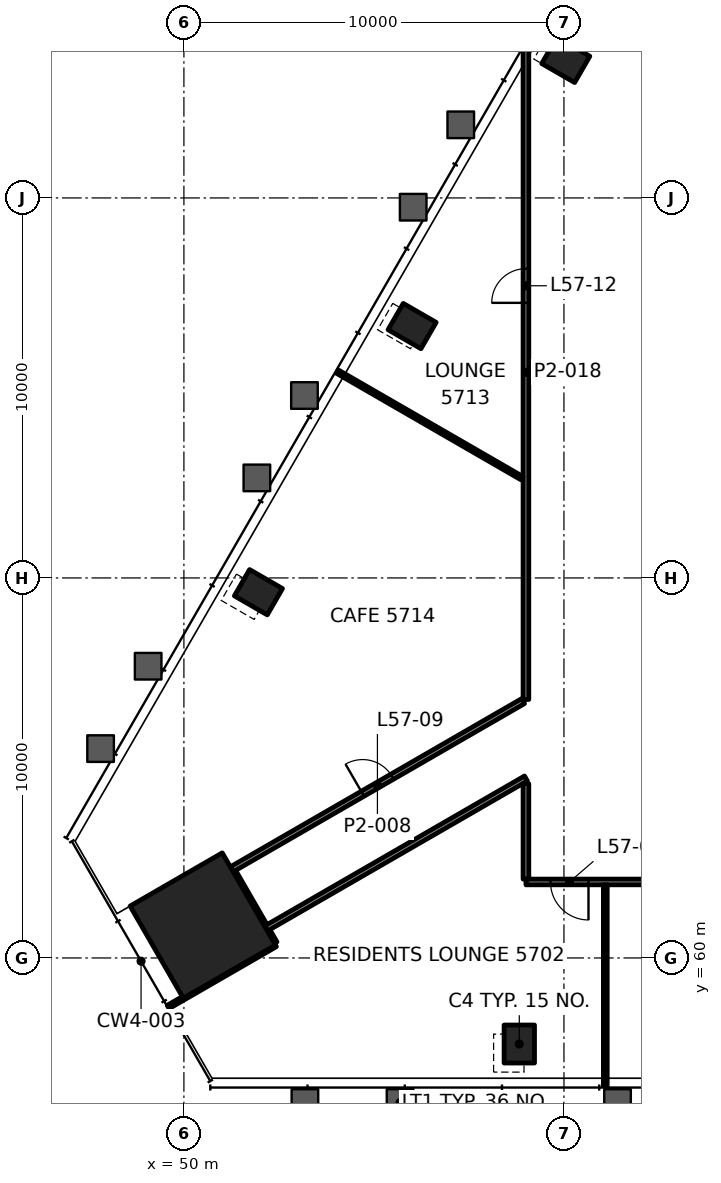
"""IFC4 building model, lengths in metres.
Left out: names, types, materials, properties, quantities, classifications, styles, units other than length and angle.
Written with IfcOpenShell. Run it as: python <this file> out.ifc"""

import sys

from ifc_helpers import new_model, si_unit, direction, frame, frame_2d, origin, origin_2d, place, context, subcontext, project, spatial, rectangle, hollow_rectangle, extrude, element, fill, save


model = new_model("IFC4")
c1 = context("Model", 3, precision=1e-05, world=origin(), true_north=direction((0.0, 1.0)))
c2 = subcontext(c1, "Body", "Model", "MODEL_VIEW")
j1 = project(units=[si_unit("LENGTHUNIT", "METRE"), si_unit("PLANEANGLEUNIT", "RADIAN")], contexts=[c1])
p1 = place(None, origin())
s1 = spatial("IfcSite", under=j1, at=p1, CompositionType="ELEMENT")
p2 = place(p1, origin())
s2 = spatial("IfcBuilding", under=s1, at=p2, CompositionType="ELEMENT")
p3 = place(p2, frame((0.0, 0.0, 241.6)))
s3 = spatial("IfcBuildingStorey", under=s2, at=p3, CompositionType="ELEMENT", Elevation=241.6)
p4 = place(p3, frame((50.496, 60.853, 0.0), z_axis=(0.0, 0.0, 1.0), x_axis=(0.5, -0.866025403784, 0.0)))
e1 = element("IfcColumn", 1, at=p4, inside=s3, PredefinedType="COLUMN", context=c2, shape_type="SweptSolid", body=[
    extrude(rectangle(XDim=2.8, YDim=2.8, at=origin_2d()), origin(), (0.0, 0.0, 1.0), 6.0),
])
for number, where, z_axis, x_axis in (
    (2, (58.825, 57.735, -0.0), (0.0, 0.0, 1.0), (1.0, 0.0, 0.0)),
    (3, (60.048, 83.632, -0.0), (0.0, 0.0, 1.0), (-0.5, -0.866, 0.0)),
    (4, (56.004, 76.628, -0.0), (0.0, 0.0, 1.0), (-0.5, -0.866, 0.0)),
    (5, (51.961, 69.625, -0.0), (0.0, 0.0, 1.0), (-0.5, -0.866, 0.0)),
):
    element("IfcColumn", number, at=place(p3, frame(where, z_axis=z_axis, x_axis=x_axis)), inside=s3, PredefinedType="COLUMN", context=c2, shape_type="SweptSolid", body=[
        extrude(hollow_rectangle(XDim=0.8, YDim=1.0, WallThickness=0.05, at=origin_2d()), origin(), (0.0, 0.0, 1.0), 6.0),
    ])
p5 = place(p3, frame((91.0, 62.0, 0.0), z_axis=(0.0, 0.0, 1.0), x_axis=(-1.0, 0.0, 0.0)))
e6 = element("IfcWall", 6, at=p5, inside=s3, PredefinedType="PARTITIONING", context=c2, shape_type="SweptSolid", body=[
    extrude(rectangle(XDim=31.999, YDim=0.15, at=frame_2d((16.0, 0.0))), origin(), (0.0, 0.0, 1.0), 4.95),
])
p6 = place(p5, frame((1.586, 0.0, 0.0)))
e7 = element("IfcOpeningElement", 7, at=p6, cuts=e6, PredefinedType="OPENING", context=c2, shape_type="SweptSolid", body=[
    extrude(rectangle(XDim=0.9, YDim=2.1, at=frame_2d((0.45, 1.05))), frame((0.0, 0.085, 0.0), z_axis=(0.0, -1.0, 0.0), x_axis=(1.0, 0.0, 0.0)), (0.0, 0.0, 1.0), 0.17),
])
p7 = place(p5, frame((10.495, 0.0, 0.0)))
e8 = element("IfcOpeningElement", 8, at=p7, cuts=e6, PredefinedType="OPENING", context=c2, shape_type="SweptSolid", body=[
    extrude(rectangle(XDim=0.9, YDim=2.1, at=frame_2d((0.45, 1.05))), frame((0.0, 0.085, 0.0), z_axis=(0.0, -1.0, 0.0), x_axis=(1.0, 0.0, 0.0)), (0.0, 0.0, 1.0), 0.17),
])
p8 = place(p5, frame((23.467, 0.0, 0.0)))
e9 = element("IfcOpeningElement", 9, at=p8, cuts=e6, PredefinedType="OPENING", context=c2, shape_type="SweptSolid", body=[
    extrude(rectangle(XDim=1.0, YDim=2.1, at=frame_2d((0.5, 1.05))), frame((0.0, 0.085, 0.0), z_axis=(0.0, -1.0, 0.0), x_axis=(1.0, 0.0, 0.0)), (0.0, 0.0, 1.0), 0.17),
])
p9 = place(p5, frame((30.354, 0.0, 0.0)))
e10 = element("IfcOpeningElement", 10, at=p9, cuts=e6, PredefinedType="OPENING", context=c2, shape_type="SweptSolid", body=[
    extrude(rectangle(XDim=1.0, YDim=2.1, at=frame_2d((0.5, 1.05))), frame((0.0, 0.085, 0.0), z_axis=(0.0, -1.0, 0.0), x_axis=(1.0, 0.0, 0.0)), (0.0, 0.0, 1.0), 0.17),
])
p10 = place(p3, frame((49.586, 58.71, 0.0), z_axis=(0.0, 0.0, 1.0), x_axis=(0.866003472149, 0.500037984783, 0.0)))
e11 = element("IfcWall", 11, at=p10, inside=s3, PredefinedType="PARTITIONING", context=c2, shape_type="SweptSolid", body=[
    extrude(rectangle(XDim=3.26, YDim=0.1, at=frame_2d((1.63, 0.0))), origin(), (0.0, 0.0, 1.0), 4.95),
])
p11 = place(p3, frame((52.159, 60.774, 0.0), z_axis=(0.0, 0.0, 1.0), x_axis=(0.866030148722, 0.499991781437, 0.0)))
e12 = element("IfcWall", 12, at=p11, inside=s3, PredefinedType="PARTITIONING", context=c2, shape_type="SweptSolid", body=[
    extrude(rectangle(XDim=7.899, YDim=0.15, at=frame_2d((3.95, 0.0))), origin(), (0.0, 0.0, 1.0), 4.797),
])
p12 = place(p3, frame((51.259, 62.333, 0.0), z_axis=(0.0, 0.0, 1.0), x_axis=(0.866028044417, 0.499995426262, 0.0)))
e13 = element("IfcWall", 13, at=p12, inside=s3, PredefinedType="PARTITIONING", context=c2, shape_type="SweptSolid", body=[
    extrude(rectangle(XDim=8.852, YDim=0.15, at=frame_2d((4.426, 0.0))), origin(), (0.0, 0.0, 1.0), 4.95),
])
p13 = place(p12, frame((3.976, 0.0, 0.0)))
e14 = element("IfcOpeningElement", 14, at=p13, cuts=e13, PredefinedType="OPENING", context=c2, shape_type="SweptSolid", body=[
    extrude(rectangle(XDim=0.9, YDim=2.1, at=frame_2d((0.45, 1.05))), frame((0.0, 0.085, 0.0), z_axis=(0.0, -1.0, 0.0), x_axis=(1.0, 0.0, 0.0)), (0.0, 0.0, 1.0), 0.17),
])
p14 = place(p3, frame((61.088, 56.635, 0.0), z_axis=(0.0, 0.0, 1.0), x_axis=(0.0, 1.0, 0.0)))
e15 = element("IfcWall", 15, at=p14, inside=s3, PredefinedType="PARTITIONING", context=c2, shape_type="SweptSolid", body=[
    extrude(rectangle(XDim=5.29, YDim=0.1, at=frame_2d((2.645, 0.0))), origin(), (0.0, 0.0, 1.0), 4.872),
])
p15 = place(p3, frame((59.0, 62.075, 0.0), z_axis=(0.0, 0.0, 1.0), x_axis=(0.0, 1.0, 0.0)))
e16 = element("IfcWall", 16, at=p15, inside=s3, PredefinedType="PARTITIONING", context=c2, shape_type="SweptSolid", body=[
    extrude(rectangle(XDim=2.511, YDim=0.15, at=frame_2d((1.255, 0.0))), origin(), (0.0, 0.0, 1.0), 4.797),
])
p16 = place(p3, frame((59.0, 66.802, 0.0), z_axis=(0.0, 0.0, 1.0), x_axis=(0.0, 1.0, 0.0)))
e17 = element("IfcWall", 17, at=p16, inside=s3, PredefinedType="PARTITIONING", context=c2, shape_type="SweptSolid", body=[
    extrude(rectangle(XDim=17.215, YDim=0.15, at=frame_2d((8.607, 0.0))), origin(), (0.0, 0.0, 1.0), 4.872),
])
p17 = place(p16, frame((10.438, 0.0, 0.0)))
e18 = element("IfcOpeningElement", 18, at=p17, cuts=e17, PredefinedType="OPENING", context=c2, shape_type="SweptSolid", body=[
    extrude(rectangle(XDim=0.9, YDim=2.1, at=frame_2d((0.45, 1.05))), frame((0.0, 0.085, 0.0), z_axis=(0.0, -1.0, 0.0), x_axis=(1.0, 0.0, 0.0)), (0.0, 0.0, 1.0), 0.17),
])
p18 = place(p3, frame((52.384, 60.384, 0.0), z_axis=(0.0, 0.0, 1.0), x_axis=(-0.500342721131, 0.865827443207, 0.0)))
e19 = element("IfcWall", 19, at=p18, inside=s3, PredefinedType="PARTITIONING", context=c2, shape_type="SweptSolid", body=[
    extrude(rectangle(XDim=0.375, YDim=0.15, at=frame_2d((0.188, 0.0))), origin(), (0.0, 0.0, 1.0), 4.95),
])
p19 = place(p3, frame((58.899, 72.623, 0.0), z_axis=(0.0, 0.0, 1.0), x_axis=(-0.866038463512, 0.499977379206, 0.0)))
e20 = element("IfcWall", 20, at=p19, inside=s3, PredefinedType="PARTITIONING", context=c2, shape_type="SweptSolid", body=[
    extrude(rectangle(XDim=5.61, YDim=0.1, at=frame_2d((2.805, 0.0))), origin(), (0.0, 0.0, 1.0), 4.872),
])
p20 = place(p3, frame((52.122, 60.839, 0.0), z_axis=(0.0, 0.0, 1.0), x_axis=(-0.499991515992, 0.866030301974, 0.0)))
e21 = element("IfcWall", 21, at=p20, inside=s3, PredefinedType="PARTITIONING", context=c2, shape_type="SweptSolid", body=[
    extrude(rectangle(XDim=1.649, YDim=0.15, at=frame_2d((0.825, 0.0))), origin(), (0.0, 0.0, 1.0), 4.797),
])
p21 = place(p9, origin())
e22 = element("IfcDoor", 22, at=p21, inside=s3, OperationType="SINGLE_SWING_RIGHT", PredefinedType="DOOR", context=c2, shape_type="SweptSolid", body=[
    extrude(rectangle(XDim=1.0, YDim=2.1, at=frame_2d((0.5, 1.05))), frame((0.0, 0.025, 0.0), z_axis=(0.0, -1.0, 0.0), x_axis=(1.0, 0.0, 0.0)), (0.0, 0.0, 1.0), 0.05),
])
fill(e10, e22)
p22 = place(p13, origin())
e23 = element("IfcDoor", 23, at=p22, inside=s3, OperationType="SINGLE_SWING_LEFT", PredefinedType="DOOR", context=c2, shape_type="SweptSolid", body=[
    extrude(rectangle(XDim=0.9, YDim=2.1, at=frame_2d((0.45, 1.05))), frame((0.0, 0.025, 0.0), z_axis=(0.0, -1.0, 0.0), x_axis=(1.0, 0.0, 0.0)), (0.0, 0.0, 1.0), 0.05),
])
fill(e14, e23)
p23 = place(p17, origin())
e24 = element("IfcDoor", 24, at=p23, inside=s3, OperationType="SINGLE_SWING_RIGHT", PredefinedType="DOOR", context=c2, shape_type="SweptSolid", body=[
    extrude(rectangle(XDim=0.9, YDim=2.1, at=frame_2d((0.45, 1.05))), frame((0.0, 0.025, 0.0), z_axis=(0.0, -1.0, 0.0), x_axis=(1.0, 0.0, 0.0)), (0.0, 0.0, 1.0), 0.05),
])
fill(e18, e24)
save(model, sys.argv[1])
